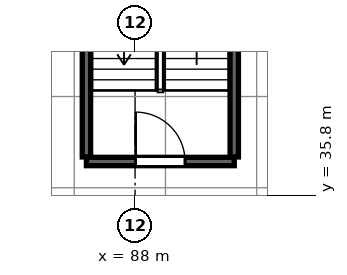
"""IFC4 building model, lengths in metres.
Left out: names, types, materials, properties, quantities, classifications, styles, units other than length and angle.
Written with IfcOpenShell. Run it as: python <this file> out.ifc"""

import sys

from ifc_helpers import new_model, si_unit, direction, frame, frame_2d, origin, place, context, subcontext, project, spatial, rectangle, extrude, source, transform, mapped, element, fill, save


model = new_model("IFC4")
c1 = context("Model", 3, precision=1e-05, world=origin(), true_north=direction((0.0, 1.0)))
c2 = subcontext(c1, "Body", "Model", "MODEL_VIEW")
j1 = project(units=[si_unit("LENGTHUNIT", "METRE"), si_unit("PLANEANGLEUNIT", "RADIAN")], contexts=[c1])
p1 = place(None, origin())
s1 = spatial("IfcSite", under=j1, at=p1, CompositionType="ELEMENT")
p2 = place(p1, origin())
s2 = spatial("IfcBuilding", under=s1, at=p2, CompositionType="ELEMENT")
p3 = place(p2, frame((0.0, 0.0, 6.0)))
s3 = spatial("IfcBuildingStorey", under=s2, at=p3, CompositionType="ELEMENT", Elevation=6.0)
m1 = source(origin(), c2, "Body", "SweptSolid", [
    extrude(rectangle(XDim=3.89, YDim=0.22, at=frame_2d((1.945, 0.0))), origin(), (0.0, 0.0, 1.0), 6.0),
])
p4 = place(p3, frame((86.72, 36.69, 0.0), z_axis=(0.0, 0.0, 1.0), x_axis=(1.0, 0.0, 0.0)))
e1 = element("IfcWall", 1, at=p4, inside=s3, PredefinedType="SOLIDWALL", context=c2, shape_type="MappedRepresentation", body=[
    mapped(m1, transform((0.0, 0.0, 0.0), scale=1.0)),
])
p5 = place(p4, frame((1.295, 0.0, 0.0)))
e2 = element("IfcOpeningElement", 2, at=p5, cuts=e1, PredefinedType="OPENING", context=c2, shape_type="SweptSolid", body=[
    extrude(rectangle(XDim=1.3, YDim=2.15, at=frame_2d((0.65, 1.075))), frame((0.0, 0.12, 0.0), z_axis=(0.0, -1.0, 0.0), x_axis=(1.0, 0.0, 0.0)), (0.0, 0.0, 1.0), 0.24),
])
m2 = source(origin(), c2, "Body", "SweptSolid", [
    extrude(rectangle(XDim=10.38, YDim=0.22, at=frame_2d((5.19, 0.0))), origin(), (0.0, 0.0, 1.0), 6.0),
])
for number, where, z_axis, x_axis in (
    (3, (86.72, 36.81, 0.0), (0.0, 0.0, 1.0), (0.0, 1.0, 0.0)),
    (4, (90.61, 36.81, 0.0), (0.0, 0.0, 1.0), (0.0, 1.0, 0.0)),
):
    element("IfcWall", number, at=place(p3, frame(where, z_axis=z_axis, x_axis=x_axis)), inside=s3, PredefinedType="SOLIDWALL", context=c2, shape_type="MappedRepresentation", body=[
        mapped(m2, transform((0.0, 0.0, 0.0), scale=1.0)),
    ])
m3 = source(origin(), c2, "Body", "SweptSolid", [
    extrude(rectangle(XDim=1.3, YDim=2.15, at=frame_2d((0.65, 1.075))), frame((0.0, 0.025, 0.0), z_axis=(0.0, -1.0, 0.0), x_axis=(1.0, 0.0, 0.0)), (0.0, 0.0, 1.0), 0.05),
])
p6 = place(p5, origin())
e5 = element("IfcDoor", 5, at=p6, inside=s3, OperationType="SINGLE_SWING_LEFT", PredefinedType="DOOR", context=c2, shape_type="MappedRepresentation", body=[
    mapped(m3, transform((0.0, 0.0, 0.0), scale=1.0)),
])
fill(e2, e5)
save(model, sys.argv[1])
